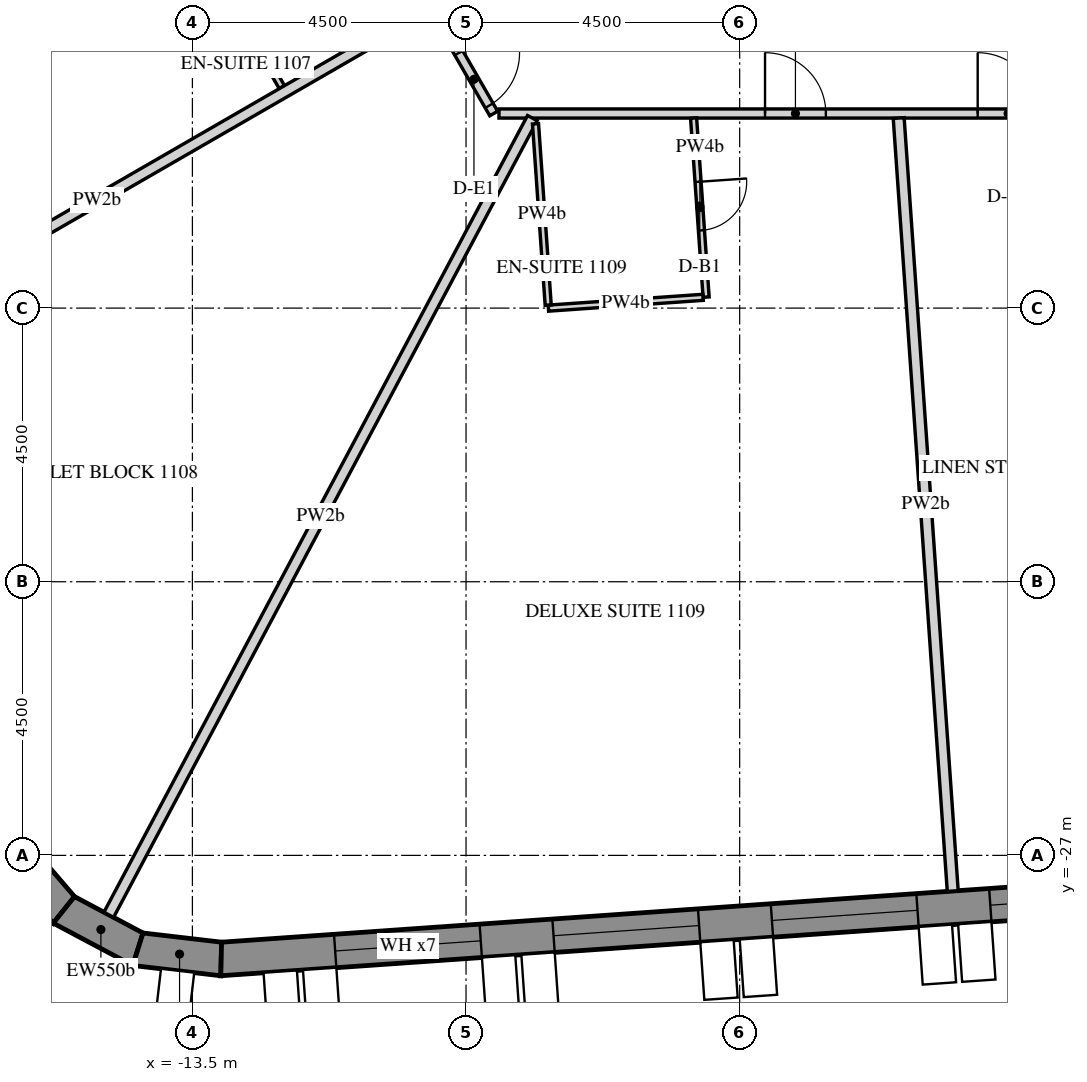
"""IFC4 building model, lengths in metres.
Left out: names, types, materials, properties, quantities, classifications, styles, units other than length and angle.
Written with IfcOpenShell. Run it as: python <this file> out.ifc"""

import sys

from ifc_helpers import new_model, si_unit, direction, frame, frame_2d, origin, place, context, subcontext, project, spatial, polyline, rectangle, outline, extrude, element, fill, save


model = new_model("IFC4")
c1 = context("Model", 3, precision=1e-05, world=origin(), true_north=direction((0.0, 1.0)))
c2 = subcontext(c1, "Body", "Model", "MODEL_VIEW")
j1 = project(units=[si_unit("LENGTHUNIT", "METRE"), si_unit("PLANEANGLEUNIT", "RADIAN")], contexts=[c1])
p1 = place(None, origin())
s1 = spatial("IfcSite", under=j1, at=p1, CompositionType="ELEMENT")
p2 = place(p1, origin())
s2 = spatial("IfcBuilding", under=s1, at=p2, CompositionType="ELEMENT")
p3 = place(p2, frame((0.0, 0.0, 152.7)))
s3 = spatial("IfcBuildingStorey", under=s2, at=p3, CompositionType="ELEMENT", Elevation=152.7)
p4 = place(p3, frame((-16.512, -26.85, 0.0), z_axis=(0.0, 0.0, 1.0), x_axis=(0.651621950847, -0.758543890078, 0.0)))
e1 = element("IfcWall", 1, at=p4, inside=s3, PredefinedType="SOLIDWALL", context=c2, shape_type="SweptSolid", body=[
    extrude(outline(polyline([(-0.026, -0.275), (1.431, -0.275), (1.327, 0.275), (0.026, 0.275), (-0.026, -0.275)])), origin(), (0.0, 0.0, 1.0), 3.75),
])
p5 = place(p3, frame((-15.614, -27.896, 0.0), z_axis=(0.0, 0.0, 1.0), x_axis=(0.882994189209, -0.469383917304, 0.0)))
e2 = element("IfcWall", 2, at=p5, inside=s3, PredefinedType="SOLIDWALL", context=c2, shape_type="SweptSolid", body=[
    extrude(outline(polyline([(-0.052, -0.275), (1.431, -0.275), (1.327, 0.275), (0.052, 0.275), (-0.052, -0.275)])), origin(), (0.0, 0.0, 1.0), 3.75),
])
p6 = place(p3, frame((-14.396, -28.543, 0.0), z_axis=(0.0, 0.0, 1.0), x_axis=(0.993232537394, -0.11614269956, 0.0)))
e3 = element("IfcWall", 3, at=p6, inside=s3, PredefinedType="SOLIDWALL", context=c2, shape_type="SweptSolid", body=[
    extrude(outline(polyline([(-0.052, -0.275), (1.405, -0.275), (1.353, 0.275), (0.052, 0.275), (-0.052, -0.275)])), origin(), (0.0, 0.0, 1.0), 3.75),
])
p7 = place(p3, frame((-13.026, -28.704, 0.0), z_axis=(0.0, 0.0, 1.0), x_axis=(0.99756406806, 0.069756219185, 0.0)))
e4 = element("IfcWall", 4, at=p7, inside=s3, PredefinedType="SOLIDWALL", context=c2, shape_type="SweptSolid", body=[
    extrude(outline(polyline([(-0.026, -0.275), (27.78, -0.275), (27.735, 0.275), (0.026, 0.275), (-0.026, -0.275)])), origin(), (0.0, 0.0, 1.0), 3.75),
])
p8 = place(p7, frame((1.879, 0.0, 0.9)))
e5 = element("IfcOpeningElement", 5, at=p8, cuts=e4, PredefinedType="OPENING", context=c2, shape_type="SweptSolid", body=[
    extrude(rectangle(XDim=2.4, YDim=2.4, at=frame_2d((1.2, 1.2))), frame((0.0, 0.285, 0.0), z_axis=(0.0, -1.0, 0.0), x_axis=(1.0, 0.0, 0.0)), (0.0, 0.0, 1.0), 0.57),
])
p9 = place(p7, frame((5.479, 0.0, 0.9)))
e6 = element("IfcOpeningElement", 6, at=p9, cuts=e4, PredefinedType="OPENING", context=c2, shape_type="SweptSolid", body=[
    extrude(rectangle(XDim=2.4, YDim=2.4, at=frame_2d((1.2, 1.2))), frame((0.0, 0.285, 0.0), z_axis=(0.0, -1.0, 0.0), x_axis=(1.0, 0.0, 0.0)), (0.0, 0.0, 1.0), 0.57),
])
p10 = place(p7, frame((9.079, 0.0, 0.9)))
e7 = element("IfcOpeningElement", 7, at=p10, cuts=e4, PredefinedType="OPENING", context=c2, shape_type="SweptSolid", body=[
    extrude(rectangle(XDim=2.4, YDim=2.4, at=frame_2d((1.2, 1.2))), frame((0.0, 0.285, 0.0), z_axis=(0.0, -1.0, 0.0), x_axis=(1.0, 0.0, 0.0)), (0.0, 0.0, 1.0), 0.57),
])
p11 = place(p7, frame((12.679, 0.0, 0.9)))
e8 = element("IfcOpeningElement", 8, at=p11, cuts=e4, PredefinedType="OPENING", context=c2, shape_type="SweptSolid", body=[
    extrude(rectangle(XDim=2.4, YDim=2.4, at=frame_2d((1.2, 1.2))), frame((0.0, 0.285, 0.0), z_axis=(0.0, -1.0, 0.0), x_axis=(1.0, 0.0, 0.0)), (0.0, 0.0, 1.0), 0.57),
])
p12 = place(p7, frame((16.279, 0.0, 0.9)))
e9 = element("IfcOpeningElement", 9, at=p12, cuts=e4, PredefinedType="OPENING", context=c2, shape_type="SweptSolid", body=[
    extrude(rectangle(XDim=2.4, YDim=2.4, at=frame_2d((1.2, 1.2))), frame((0.0, 0.285, 0.0), z_axis=(0.0, -1.0, 0.0), x_axis=(1.0, 0.0, 0.0)), (0.0, 0.0, 1.0), 0.57),
])
p13 = place(p7, frame((19.879, 0.0, 0.9)))
e10 = element("IfcOpeningElement", 10, at=p13, cuts=e4, PredefinedType="OPENING", context=c2, shape_type="SweptSolid", body=[
    extrude(rectangle(XDim=2.4, YDim=2.4, at=frame_2d((1.2, 1.2))), frame((0.0, 0.285, 0.0), z_axis=(0.0, -1.0, 0.0), x_axis=(1.0, 0.0, 0.0)), (0.0, 0.0, 1.0), 0.57),
])
p14 = place(p7, frame((23.479, 0.0, 0.9)))
e11 = element("IfcOpeningElement", 11, at=p14, cuts=e4, PredefinedType="OPENING", context=c2, shape_type="SweptSolid", body=[
    extrude(rectangle(XDim=2.4, YDim=2.4, at=frame_2d((1.2, 1.2))), frame((0.0, 0.285, 0.0), z_axis=(0.0, -1.0, 0.0), x_axis=(1.0, 0.0, 0.0)), (0.0, 0.0, 1.0), 0.57),
])
p15 = place(p3, frame((-15.863, -2.125, 0.0), z_axis=(0.0, 0.0, 1.0), x_axis=(0.500008833422, -0.866020303746, 0.0)))
e12 = element("IfcWall", 12, at=p15, inside=s3, PredefinedType="PARTITIONING", context=c2, shape_type="SweptSolid", body=[
    extrude(rectangle(XDim=14.636, YDim=0.15, at=frame_2d((7.318, 0.0))), origin(), (0.0, 0.0, 1.0), 2.823),
])
p16 = place(p15, frame((0.961, 0.0, 0.0)))
e13 = element("IfcOpeningElement", 13, at=p16, cuts=e12, PredefinedType="OPENING", context=c2, shape_type="SweptSolid", body=[
    extrude(rectangle(XDim=1.0, YDim=2.1, at=frame_2d((0.5, 1.05))), frame((0.0, 0.085, 0.0), z_axis=(0.0, -1.0, 0.0), x_axis=(1.0, 0.0, 0.0)), (0.0, 0.0, 1.0), 0.17),
])
p17 = place(p15, frame((7.309, 0.0, 0.0)))
e14 = element("IfcOpeningElement", 14, at=p17, cuts=e12, PredefinedType="OPENING", context=c2, shape_type="SweptSolid", body=[
    extrude(rectangle(XDim=1.0, YDim=2.1, at=frame_2d((0.5, 1.05))), frame((0.0, 0.085, 0.0), z_axis=(0.0, -1.0, 0.0), x_axis=(1.0, 0.0, 0.0)), (0.0, 0.0, 1.0), 0.17),
])
p18 = place(p15, frame((13.486, 0.0, 0.0)))
e15 = element("IfcOpeningElement", 15, at=p18, cuts=e12, PredefinedType="OPENING", context=c2, shape_type="SweptSolid", body=[
    extrude(rectangle(XDim=1.0, YDim=2.1, at=frame_2d((0.5, 1.05))), frame((0.0, 0.085, 0.0), z_axis=(0.0, -1.0, 0.0), x_axis=(1.0, 0.0, 0.0)), (0.0, 0.0, 1.0), 0.17),
])
p19 = place(p3, frame((-8.458, -14.8, 0.0), z_axis=(0.0, 0.0, 1.0), x_axis=(1.0, 0.0, 0.0)))
e16 = element("IfcWall", 16, at=p19, inside=s3, PredefinedType="PARTITIONING", context=c2, shape_type="SweptSolid", body=[
    extrude(rectangle(XDim=14.549, YDim=0.15, at=frame_2d((7.275, 0.0))), origin(), (0.0, 0.0, 1.0), 2.823),
])
p20 = place(p19, frame((4.375, 0.0, 0.0)))
e17 = element("IfcOpeningElement", 17, at=p20, cuts=e16, PredefinedType="OPENING", context=c2, shape_type="SweptSolid", body=[
    extrude(rectangle(XDim=1.0, YDim=2.1, at=frame_2d((0.5, 1.05))), frame((0.0, 0.085, 0.0), z_axis=(0.0, -1.0, 0.0), x_axis=(1.0, 0.0, 0.0)), (0.0, 0.0, 1.0), 0.17),
])
p21 = place(p19, frame((7.872, 0.0, 0.0)))
e18 = element("IfcOpeningElement", 18, at=p21, cuts=e16, PredefinedType="OPENING", context=c2, shape_type="SweptSolid", body=[
    extrude(rectangle(XDim=1.0, YDim=2.1, at=frame_2d((0.5, 1.05))), frame((0.0, 0.085, 0.0), z_axis=(0.0, -1.0, 0.0), x_axis=(1.0, 0.0, 0.0)), (0.0, 0.0, 1.0), 0.17),
])
p22 = place(p19, frame((10.609, 0.0, 0.0)))
e19 = element("IfcOpeningElement", 19, at=p22, cuts=e16, PredefinedType="OPENING", context=c2, shape_type="SweptSolid", body=[
    extrude(rectangle(XDim=1.0, YDim=2.1, at=frame_2d((0.5, 1.05))), frame((0.0, 0.085, 0.0), z_axis=(0.0, -1.0, 0.0), x_axis=(1.0, 0.0, 0.0)), (0.0, 0.0, 1.0), 0.17),
])
p23 = place(p3, frame((-12.028, -14.367, 0.0), z_axis=(0.0, 0.0, 1.0), x_axis=(-0.500015210774, 0.866016621662, 0.0)))
e20 = element("IfcWall", 20, at=p23, inside=s3, PredefinedType="PARTITIONING", context=c2, shape_type="SweptSolid", body=[
    extrude(rectangle(XDim=2.31, YDim=0.1, at=frame_2d((1.155, 0.0))), origin(), (0.0, 0.0, 1.0), 2.823),
])
p24 = place(p3, frame((-20.513, -19.37, 0.0), z_axis=(0.0, 0.0, 1.0), x_axis=(0.866019402111, 0.500010395058, 0.0)))
e21 = element("IfcWall", 21, at=p24, inside=s3, PredefinedType="PARTITIONING", context=c2, shape_type="SweptSolid", body=[
    extrude(rectangle(XDim=12.575, YDim=0.18, at=frame_2d((6.288, 0.0))), origin(), (0.0, 0.0, 1.0), 2.823),
])
p25 = place(p3, frame((-14.876, -27.977, 0.0), z_axis=(0.0, 0.0, 1.0), x_axis=(0.469475175214, 0.882945672088, 0.0)))
e22 = element("IfcWall", 22, at=p25, inside=s3, PredefinedType="PARTITIONING", context=c2, shape_type="SweptSolid", body=[
    extrude(rectangle(XDim=14.839, YDim=0.18, at=frame_2d((7.419, 0.0))), origin(), (0.0, 0.0, 1.0), 2.823),
])
p26 = place(p3, frame((-5.258, -14.875, 0.0), z_axis=(0.0, 0.0, 1.0), x_axis=(0.069812665072, -0.997560119389, 0.0)))
e23 = element("IfcWall", 23, at=p26, inside=s3, PredefinedType="PARTITIONING", context=c2, shape_type="SweptSolid", body=[
    extrude(rectangle(XDim=2.951, YDim=0.1, at=frame_2d((1.476, 0.0))), origin(), (0.0, 0.0, 1.0), 2.823),
])
p27 = place(p26, frame((1.052, 0.0, 0.0)))
e24 = element("IfcOpeningElement", 24, at=p27, cuts=e23, PredefinedType="OPENING", context=c2, shape_type="SweptSolid", body=[
    extrude(rectangle(XDim=0.8, YDim=2.1, at=frame_2d((0.4, 1.05))), frame((0.0, 0.06, 0.0), z_axis=(0.0, -1.0, 0.0), x_axis=(1.0, 0.0, 0.0)), (0.0, 0.0, 1.0), 0.12),
])
p28 = place(p3, frame((-5.102, -17.823, 0.0), z_axis=(0.0, 0.0, 1.0), x_axis=(-0.997561167558, -0.069797686069, 0.0)))
e25 = element("IfcWall", 25, at=p28, inside=s3, PredefinedType="PARTITIONING", context=c2, shape_type="SweptSolid", body=[
    extrude(rectangle(XDim=2.55, YDim=0.1, at=frame_2d((1.275, 0.0))), origin(), (0.0, 0.0, 1.0), 2.823),
])
p29 = place(p3, frame((-7.649, -17.951, 0.0), z_axis=(0.0, 0.0, 1.0), x_axis=(-0.069760844897, 0.997563744589, 0.0)))
e26 = element("IfcWall", 26, at=p29, inside=s3, PredefinedType="PARTITIONING", context=c2, shape_type="SweptSolid", body=[
    extrude(rectangle(XDim=2.989, YDim=0.1, at=frame_2d((1.494, 0.0))), origin(), (0.0, 0.0, 1.0), 2.823),
])
p30 = place(p3, frame((-0.996, -27.587, 0.0), z_axis=(0.0, 0.0, 1.0), x_axis=(-0.069758774678, 0.99756388936, 0.0)))
e27 = element("IfcWall", 27, at=p30, inside=s3, PredefinedType="PARTITIONING", context=c2, shape_type="SweptSolid", body=[
    extrude(rectangle(XDim=12.743, YDim=0.18, at=frame_2d((6.371, 0.0))), origin(), (0.0, 0.0, 1.0), 2.823),
])
p31 = place(p8, frame((0.0, 0.205, 0.0)))
e28 = element("IfcWindow", 28, at=p31, inside=s3, PartitioningType="DOUBLE_PANEL_VERTICAL", PredefinedType="WINDOW", context=c2, shape_type="SweptSolid", body=[
    extrude(rectangle(XDim=2.4, YDim=2.4, at=frame_2d((1.2, 1.2))), frame((0.0, 0.03, 0.0), z_axis=(0.0, -1.0, 0.0), x_axis=(1.0, 0.0, 0.0)), (0.0, 0.0, 1.0), 0.06),
])
fill(e5, e28)
p32 = place(p9, frame((0.0, 0.205, 0.0)))
e29 = element("IfcWindow", 29, at=p32, inside=s3, PartitioningType="DOUBLE_PANEL_VERTICAL", PredefinedType="WINDOW", context=c2, shape_type="SweptSolid", body=[
    extrude(rectangle(XDim=2.4, YDim=2.4, at=frame_2d((1.2, 1.2))), frame((0.0, 0.03, 0.0), z_axis=(0.0, -1.0, 0.0), x_axis=(1.0, 0.0, 0.0)), (0.0, 0.0, 1.0), 0.06),
])
fill(e6, e29)
p33 = place(p10, frame((0.0, 0.205, 0.0)))
e30 = element("IfcWindow", 30, at=p33, inside=s3, PartitioningType="DOUBLE_PANEL_VERTICAL", PredefinedType="WINDOW", context=c2, shape_type="SweptSolid", body=[
    extrude(rectangle(XDim=2.4, YDim=2.4, at=frame_2d((1.2, 1.2))), frame((0.0, 0.03, 0.0), z_axis=(0.0, -1.0, 0.0), x_axis=(1.0, 0.0, 0.0)), (0.0, 0.0, 1.0), 0.06),
])
fill(e7, e30)
p34 = place(p11, frame((0.0, 0.205, 0.0)))
e31 = element("IfcWindow", 31, at=p34, inside=s3, PartitioningType="DOUBLE_PANEL_VERTICAL", PredefinedType="WINDOW", context=c2, shape_type="SweptSolid", body=[
    extrude(rectangle(XDim=2.4, YDim=2.4, at=frame_2d((1.2, 1.2))), frame((0.0, 0.03, 0.0), z_axis=(0.0, -1.0, 0.0), x_axis=(1.0, 0.0, 0.0)), (0.0, 0.0, 1.0), 0.06),
])
fill(e8, e31)
p35 = place(p18, origin())
e32 = element("IfcDoor", 32, at=p35, inside=s3, OperationType="SINGLE_SWING_LEFT", PredefinedType="DOOR", context=c2, shape_type="SweptSolid", body=[
    extrude(rectangle(XDim=1.0, YDim=2.1, at=frame_2d((0.5, 1.05))), frame((0.0, 0.025, 0.0), z_axis=(0.0, -1.0, 0.0), x_axis=(1.0, 0.0, 0.0)), (0.0, 0.0, 1.0), 0.05),
])
fill(e15, e32)
p36 = place(p20, origin())
e33 = element("IfcDoor", 33, at=p36, inside=s3, OperationType="SINGLE_SWING_LEFT", PredefinedType="DOOR", context=c2, shape_type="SweptSolid", body=[
    extrude(rectangle(XDim=1.0, YDim=2.1, at=frame_2d((0.5, 1.05))), frame((0.0, 0.025, 0.0), z_axis=(0.0, -1.0, 0.0), x_axis=(1.0, 0.0, 0.0)), (0.0, 0.0, 1.0), 0.05),
])
fill(e17, e33)
p37 = place(p27, origin())
e34 = element("IfcDoor", 34, at=p37, inside=s3, OperationType="SINGLE_SWING_LEFT", PredefinedType="DOOR", context=c2, shape_type="SweptSolid", body=[
    extrude(rectangle(XDim=0.8, YDim=2.1, at=frame_2d((0.4, 1.05))), frame((0.0, 0.025, 0.0), z_axis=(0.0, -1.0, 0.0), x_axis=(1.0, 0.0, 0.0)), (0.0, 0.0, 1.0), 0.05),
])
fill(e24, e34)
p38 = place(p21, origin())
e35 = element("IfcDoor", 35, at=p38, inside=s3, OperationType="SINGLE_SWING_RIGHT", PredefinedType="DOOR", context=c2, shape_type="SweptSolid", body=[
    extrude(rectangle(XDim=1.0, YDim=2.1, at=frame_2d((0.5, 1.05))), frame((0.0, 0.025, 0.0), z_axis=(0.0, -1.0, 0.0), x_axis=(1.0, 0.0, 0.0)), (0.0, 0.0, 1.0), 0.05),
])
fill(e18, e35)
save(model, sys.argv[1])
